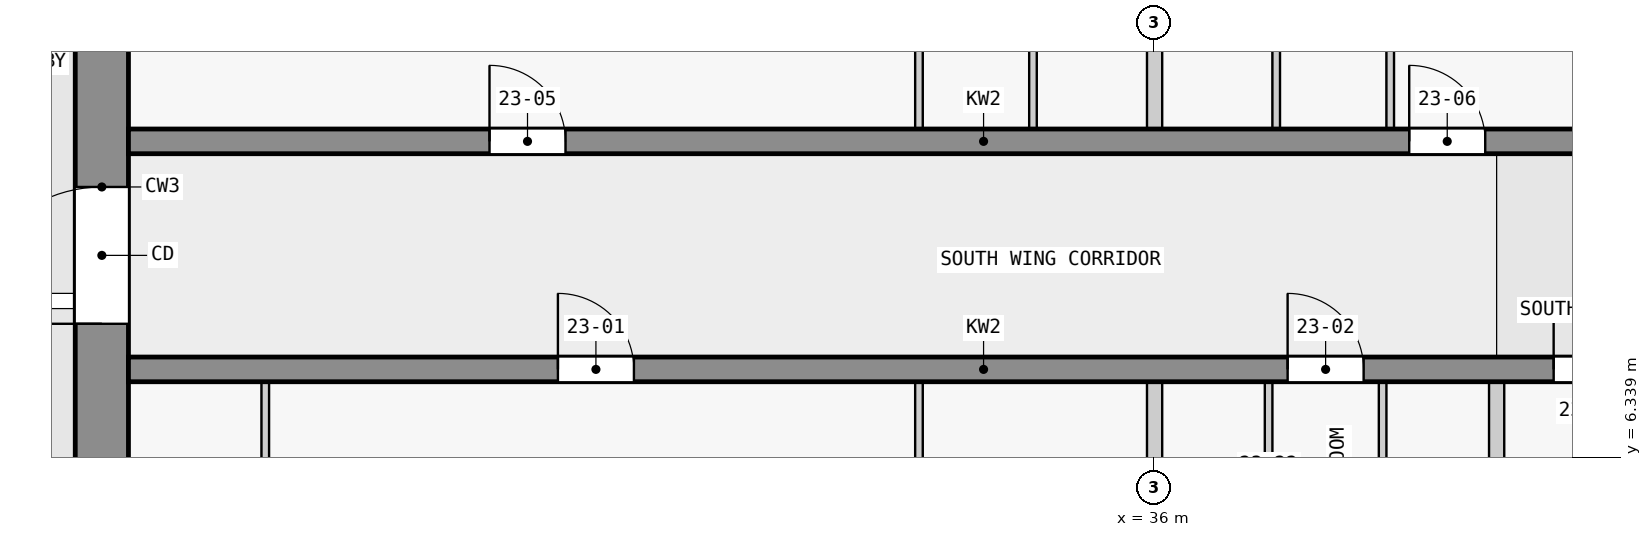
"""IFC4 building model, lengths in metres.
Left out: names, types, materials, properties, quantities, classifications, styles, units other than length and angle.
Written with IfcOpenShell. Run it as: python <this file> out.ifc"""

import sys

from ifc_helpers import new_model, si_unit, direction, frame, frame_2d, origin, place, context, subcontext, project, spatial, rectangle, extrude, element, fill, save


model = new_model("IFC4")
c1 = context("Model", 3, precision=1e-05, world=origin(), true_north=direction((0.0, 1.0)))
c2 = subcontext(c1, "Body", "Model", "MODEL_VIEW")
j1 = project(units=[si_unit("LENGTHUNIT", "METRE"), si_unit("PLANEANGLEUNIT", "RADIAN")], contexts=[c1])
p1 = place(None, origin())
s1 = spatial("IfcSite", under=j1, at=p1, CompositionType="ELEMENT")
p2 = place(p1, origin())
s2 = spatial("IfcBuilding", under=s1, at=p2, CompositionType="ELEMENT")
p3 = place(p2, frame((0.0, 0.0, 92.3)))
s3 = spatial("IfcBuildingStorey", under=s2, at=p3, CompositionType="ELEMENT", Elevation=92.3)
p4 = place(p3, frame((22.15, 2.5, 0.0), z_axis=(0.0, 0.0, 1.0), x_axis=(0.0, 1.0, 0.0)))
e1 = element("IfcWall", 1, at=p4, inside=s3, PredefinedType="SHEAR", context=c2, shape_type="SweptSolid", body=[
    extrude(rectangle(XDim=14.8, YDim=0.7, at=frame_2d((7.4, 0.0))), origin(), (0.0, 0.0, 1.0), 3.25),
])
p5 = place(p4, frame((5.6, 0.0, 0.0)))
e2 = element("IfcOpeningElement", 2, at=p5, cuts=e1, PredefinedType="OPENING", context=c2, shape_type="SweptSolid", body=[
    extrude(rectangle(XDim=1.8, YDim=2.1, at=frame_2d((0.9, 1.05))), frame((0.0, 0.36, 0.0), z_axis=(0.0, -1.0, 0.0), x_axis=(1.0, 0.0, 0.0)), (0.0, 0.0, 1.0), 0.72),
])
p6 = place(p3, frame((22.5, 7.5, 0.0), z_axis=(0.0, 0.0, 1.0), x_axis=(1.0, 0.0, 0.0)))
e3 = element("IfcWall", 3, at=p6, inside=s3, PredefinedType="SHEAR", context=c2, shape_type="SweptSolid", body=[
    extrude(rectangle(XDim=22.5, YDim=0.325, at=frame_2d((11.25, 0.0))), origin(), (0.0, 0.0, 1.0), 3.25),
])
p7 = place(p6, frame((5.65, 0.0, 0.0)))
e4 = element("IfcOpeningElement", 4, at=p7, cuts=e3, PredefinedType="OPENING", context=c2, shape_type="SweptSolid", body=[
    extrude(rectangle(XDim=1.0, YDim=2.1, at=frame_2d((0.5, 1.05))), frame((0.0, 0.172, 0.0), z_axis=(0.0, -1.0, 0.0), x_axis=(1.0, 0.0, 0.0)), (0.0, 0.0, 1.0), 0.345),
])
p8 = place(p6, frame((15.25, 0.0, 0.0)))
e5 = element("IfcOpeningElement", 5, at=p8, cuts=e3, PredefinedType="OPENING", context=c2, shape_type="SweptSolid", body=[
    extrude(rectangle(XDim=1.0, YDim=2.1, at=frame_2d((0.5, 1.05))), frame((0.0, 0.172, 0.0), z_axis=(0.0, -1.0, 0.0), x_axis=(1.0, 0.0, 0.0)), (0.0, 0.0, 1.0), 0.345),
])
p9 = place(p6, frame((18.75, 0.0, 0.0)))
e6 = element("IfcOpeningElement", 6, at=p9, cuts=e3, PredefinedType="OPENING", context=c2, shape_type="SweptSolid", body=[
    extrude(rectangle(XDim=0.9, YDim=2.1, at=frame_2d((0.45, 1.05))), frame((0.0, 0.172, 0.0), z_axis=(0.0, -1.0, 0.0), x_axis=(1.0, 0.0, 0.0)), (0.0, 0.0, 1.0), 0.345),
])
p10 = place(p6, frame((20.95, 0.0, 0.0)))
e7 = element("IfcOpeningElement", 7, at=p10, cuts=e3, PredefinedType="OPENING", context=c2, shape_type="SweptSolid", body=[
    extrude(rectangle(XDim=1.0, YDim=2.1, at=frame_2d((0.5, 1.05))), frame((0.0, 0.172, 0.0), z_axis=(0.0, -1.0, 0.0), x_axis=(1.0, 0.0, 0.0)), (0.0, 0.0, 1.0), 0.345),
])
p11 = place(p3, frame((22.5, 10.5, 0.0), z_axis=(0.0, 0.0, 1.0), x_axis=(1.0, 0.0, 0.0)))
e8 = element("IfcWall", 8, at=p11, inside=s3, PredefinedType="SHEAR", context=c2, shape_type="SweptSolid", body=[
    extrude(rectangle(XDim=22.5, YDim=0.325, at=frame_2d((11.25, 0.0))), origin(), (0.0, 0.0, 1.0), 3.25),
])
p12 = place(p11, frame((4.75, 0.0, 0.0)))
e9 = element("IfcOpeningElement", 9, at=p12, cuts=e8, PredefinedType="OPENING", context=c2, shape_type="SweptSolid", body=[
    extrude(rectangle(XDim=1.0, YDim=2.1, at=frame_2d((0.5, 1.05))), frame((0.0, 0.172, 0.0), z_axis=(0.0, -1.0, 0.0), x_axis=(1.0, 0.0, 0.0)), (0.0, 0.0, 1.0), 0.345),
])
p13 = place(p11, frame((16.85, 0.0, 0.0)))
e10 = element("IfcOpeningElement", 10, at=p13, cuts=e8, PredefinedType="OPENING", context=c2, shape_type="SweptSolid", body=[
    extrude(rectangle(XDim=1.0, YDim=2.1, at=frame_2d((0.5, 1.05))), frame((0.0, 0.172, 0.0), z_axis=(0.0, -1.0, 0.0), x_axis=(1.0, 0.0, 0.0)), (0.0, 0.0, 1.0), 0.345),
])
p14 = place(p3, frame((24.3, 3.938, 0.0), z_axis=(0.0, 0.0, 1.0), x_axis=(0.0, 1.0, 0.0)))
e11 = element("IfcWall", 11, at=p14, inside=s3, PredefinedType="PARTITIONING", context=c2, shape_type="SweptSolid", body=[
    extrude(rectangle(XDim=3.4, YDim=0.1, at=frame_2d((1.7, 0.0))), origin(), (0.0, 0.0, 1.0), 3.25),
])
p15 = place(p14, frame((1.25, 0.0, 0.0)))
e12 = element("IfcOpeningElement", 12, at=p15, cuts=e11, PredefinedType="OPENING", context=c2, shape_type="SweptSolid", body=[
    extrude(rectangle(XDim=0.9, YDim=2.1, at=frame_2d((0.45, 1.05))), frame((0.0, 0.06, 0.0), z_axis=(0.0, -1.0, 0.0), x_axis=(1.0, 0.0, 0.0)), (0.0, 0.0, 1.0), 0.12),
])
p16 = place(p3, frame((32.9, 7.337, 0.0), z_axis=(0.0, 0.0, 1.0), x_axis=(0.0, -1.0, 0.0)))
e13 = element("IfcWall", 13, at=p16, inside=s3, PredefinedType="PARTITIONING", context=c2, shape_type="SweptSolid", body=[
    extrude(rectangle(XDim=3.35, YDim=0.1, at=frame_2d((1.675, 0.0))), origin(), (0.0, 0.0, 1.0), 3.25),
])
p17 = place(p16, frame((1.25, 0.0, 0.0)))
e14 = element("IfcOpeningElement", 14, at=p17, cuts=e13, PredefinedType="OPENING", context=c2, shape_type="SweptSolid", body=[
    extrude(rectangle(XDim=0.9, YDim=2.1, at=frame_2d((0.45, 1.05))), frame((0.0, 0.06, 0.0), z_axis=(0.0, -1.0, 0.0), x_axis=(1.0, 0.0, 0.0)), (0.0, 0.0, 1.0), 0.12),
])
p18 = place(p3, frame((32.9, 14.012, 0.0), z_axis=(0.0, 0.0, 1.0), x_axis=(0.0, -1.0, 0.0)))
e15 = element("IfcWall", 15, at=p18, inside=s3, PredefinedType="PARTITIONING", context=c2, shape_type="SweptSolid", body=[
    extrude(rectangle(XDim=3.35, YDim=0.1, at=frame_2d((1.675, 0.0))), origin(), (0.0, 0.0, 1.0), 3.25),
])
p19 = place(p18, frame((1.25, 0.0, 0.0)))
e16 = element("IfcOpeningElement", 16, at=p19, cuts=e15, PredefinedType="OPENING", context=c2, shape_type="SweptSolid", body=[
    extrude(rectangle(XDim=0.9, YDim=2.1, at=frame_2d((0.45, 1.05))), frame((0.0, 0.06, 0.0), z_axis=(0.0, -1.0, 0.0), x_axis=(1.0, 0.0, 0.0)), (0.0, 0.0, 1.0), 0.12),
])
p20 = place(p3, frame((34.4, 10.663, 0.0), z_axis=(0.0, 0.0, 1.0), x_axis=(0.0, 1.0, 0.0)))
e17 = element("IfcWall", 17, at=p20, inside=s3, PredefinedType="PARTITIONING", context=c2, shape_type="SweptSolid", body=[
    extrude(rectangle(XDim=3.35, YDim=0.1, at=frame_2d((1.675, 0.0))), origin(), (0.0, 0.0, 1.0), 3.25),
])
p21 = place(p3, frame((36.0, 1.4, 0.0), z_axis=(0.0, 0.0, 1.0), x_axis=(0.0, 1.0, 0.0)))
e18 = element("IfcWall", 18, at=p21, inside=s3, PredefinedType="PARTITIONING", context=c2, shape_type="SweptSolid", body=[
    extrude(rectangle(XDim=5.938, YDim=0.2, at=frame_2d((2.969, 0.0))), origin(), (0.0, 0.0, 1.0), 3.25),
])
p22 = place(p3, frame((36.0, 10.663, 0.0), z_axis=(0.0, 0.0, 1.0), x_axis=(0.0, 1.0, 0.0)))
e19 = element("IfcWall", 19, at=p22, inside=s3, PredefinedType="PARTITIONING", context=c2, shape_type="SweptSolid", body=[
    extrude(rectangle(XDim=3.4, YDim=0.2, at=frame_2d((1.7, 0.0))), origin(), (0.0, 0.0, 1.0), 3.25),
])
p23 = place(p3, frame((37.5, 3.988, 0.0), z_axis=(0.0, 0.0, 1.0), x_axis=(0.0, 1.0, 0.0)))
e20 = element("IfcWall", 20, at=p23, inside=s3, PredefinedType="PARTITIONING", context=c2, shape_type="SweptSolid", body=[
    extrude(rectangle(XDim=3.35, YDim=0.1, at=frame_2d((1.675, 0.0))), origin(), (0.0, 0.0, 1.0), 3.25),
])
p24 = place(p23, frame((1.25, 0.0, 0.0)))
e21 = element("IfcOpeningElement", 21, at=p24, cuts=e20, PredefinedType="OPENING", context=c2, shape_type="SweptSolid", body=[
    extrude(rectangle(XDim=0.9, YDim=2.1, at=frame_2d((0.45, 1.05))), frame((0.0, 0.06, 0.0), z_axis=(0.0, -1.0, 0.0), x_axis=(1.0, 0.0, 0.0)), (0.0, 0.0, 1.0), 0.12),
])
p25 = place(p3, frame((37.6, 10.663, 0.0), z_axis=(0.0, 0.0, 1.0), x_axis=(0.0, 1.0, 0.0)))
e22 = element("IfcWall", 22, at=p25, inside=s3, PredefinedType="PARTITIONING", context=c2, shape_type="SweptSolid", body=[
    extrude(rectangle(XDim=3.35, YDim=0.1, at=frame_2d((1.675, 0.0))), origin(), (0.0, 0.0, 1.0), 3.25),
])
p26 = place(p3, frame((39.0, 7.337, 0.0), z_axis=(0.0, 0.0, 1.0), x_axis=(0.0, -1.0, 0.0)))
e23 = element("IfcWall", 23, at=p26, inside=s3, PredefinedType="PARTITIONING", context=c2, shape_type="SweptSolid", body=[
    extrude(rectangle(XDim=3.4, YDim=0.1, at=frame_2d((1.7, 0.0))), origin(), (0.0, 0.0, 1.0), 3.25),
])
p27 = place(p26, frame((1.25, 0.0, 0.0)))
e24 = element("IfcOpeningElement", 24, at=p27, cuts=e23, PredefinedType="OPENING", context=c2, shape_type="SweptSolid", body=[
    extrude(rectangle(XDim=0.9, YDim=2.1, at=frame_2d((0.45, 1.05))), frame((0.0, 0.06, 0.0), z_axis=(0.0, -1.0, 0.0), x_axis=(1.0, 0.0, 0.0)), (0.0, 0.0, 1.0), 0.12),
])
p28 = place(p3, frame((39.1, 10.663, 0.0), z_axis=(0.0, 0.0, 1.0), x_axis=(0.0, 1.0, 0.0)))
e25 = element("IfcWall", 25, at=p28, inside=s3, PredefinedType="PARTITIONING", context=c2, shape_type="SweptSolid", body=[
    extrude(rectangle(XDim=3.35, YDim=0.1, at=frame_2d((1.675, 0.0))), origin(), (0.0, 0.0, 1.0), 3.25),
])
p29 = place(p28, frame((1.25, 0.0, 0.0)))
e26 = element("IfcOpeningElement", 26, at=p29, cuts=e25, PredefinedType="OPENING", context=c2, shape_type="SweptSolid", body=[
    extrude(rectangle(XDim=0.9, YDim=2.1, at=frame_2d((0.45, 1.05))), frame((0.0, 0.06, 0.0), z_axis=(0.0, -1.0, 0.0), x_axis=(1.0, 0.0, 0.0)), (0.0, 0.0, 1.0), 0.12),
])
p30 = place(p3, frame((40.5, 3.938, 0.0), z_axis=(0.0, 0.0, 1.0), x_axis=(0.0, 1.0, 0.0)))
e27 = element("IfcWall", 27, at=p30, inside=s3, PredefinedType="PARTITIONING", context=c2, shape_type="SweptSolid", body=[
    extrude(rectangle(XDim=3.4, YDim=0.2, at=frame_2d((1.7, 0.0))), origin(), (0.0, 0.0, 1.0), 3.25),
])
p31 = place(p5, origin())
e28 = element("IfcDoor", 28, at=p31, inside=s3, OperationType="DOUBLE_DOOR_SINGLE_SWING", PredefinedType="DOOR", context=c2, shape_type="SweptSolid", body=[
    extrude(rectangle(XDim=1.8, YDim=2.1, at=frame_2d((0.9, 1.05))), frame((0.0, 0.025, 0.0), z_axis=(0.0, -1.0, 0.0), x_axis=(1.0, 0.0, 0.0)), (0.0, 0.0, 1.0), 0.05),
])
fill(e2, e28)
p32 = place(p7, origin())
e29 = element("IfcDoor", 29, at=p32, inside=s3, OperationType="SINGLE_SWING_LEFT", PredefinedType="DOOR", context=c2, shape_type="SweptSolid", body=[
    extrude(rectangle(XDim=1.0, YDim=2.1, at=frame_2d((0.5, 1.05))), frame((0.0, 0.025, 0.0), z_axis=(0.0, -1.0, 0.0), x_axis=(1.0, 0.0, 0.0)), (0.0, 0.0, 1.0), 0.05),
])
fill(e4, e29)
p33 = place(p8, origin())
e30 = element("IfcDoor", 30, at=p33, inside=s3, OperationType="SINGLE_SWING_RIGHT", PredefinedType="DOOR", context=c2, shape_type="SweptSolid", body=[
    extrude(rectangle(XDim=1.0, YDim=2.1, at=frame_2d((0.5, 1.05))), frame((0.0, 0.025, 0.0), z_axis=(0.0, -1.0, 0.0), x_axis=(1.0, 0.0, 0.0)), (0.0, 0.0, 1.0), 0.05),
])
fill(e5, e30)
p34 = place(p9, origin())
e31 = element("IfcDoor", 31, at=p34, inside=s3, OperationType="SINGLE_SWING_RIGHT", PredefinedType="DOOR", context=c2, shape_type="SweptSolid", body=[
    extrude(rectangle(XDim=0.9, YDim=2.1, at=frame_2d((0.45, 1.05))), frame((0.0, 0.025, 0.0), z_axis=(0.0, -1.0, 0.0), x_axis=(1.0, 0.0, 0.0)), (0.0, 0.0, 1.0), 0.05),
])
fill(e6, e31)
p35 = place(p12, origin())
e32 = element("IfcDoor", 32, at=p35, inside=s3, OperationType="SINGLE_SWING_LEFT", PredefinedType="DOOR", context=c2, shape_type="SweptSolid", body=[
    extrude(rectangle(XDim=1.0, YDim=2.1, at=frame_2d((0.5, 1.05))), frame((0.0, 0.025, 0.0), z_axis=(0.0, -1.0, 0.0), x_axis=(1.0, 0.0, 0.0)), (0.0, 0.0, 1.0), 0.05),
])
fill(e9, e32)
p36 = place(p13, origin())
e33 = element("IfcDoor", 33, at=p36, inside=s3, OperationType="SINGLE_SWING_RIGHT", PredefinedType="DOOR", context=c2, shape_type="SweptSolid", body=[
    extrude(rectangle(XDim=1.0, YDim=2.1, at=frame_2d((0.5, 1.05))), frame((0.0, 0.025, 0.0), z_axis=(0.0, -1.0, 0.0), x_axis=(1.0, 0.0, 0.0)), (0.0, 0.0, 1.0), 0.05),
])
fill(e10, e33)
save(model, sys.argv[1])
